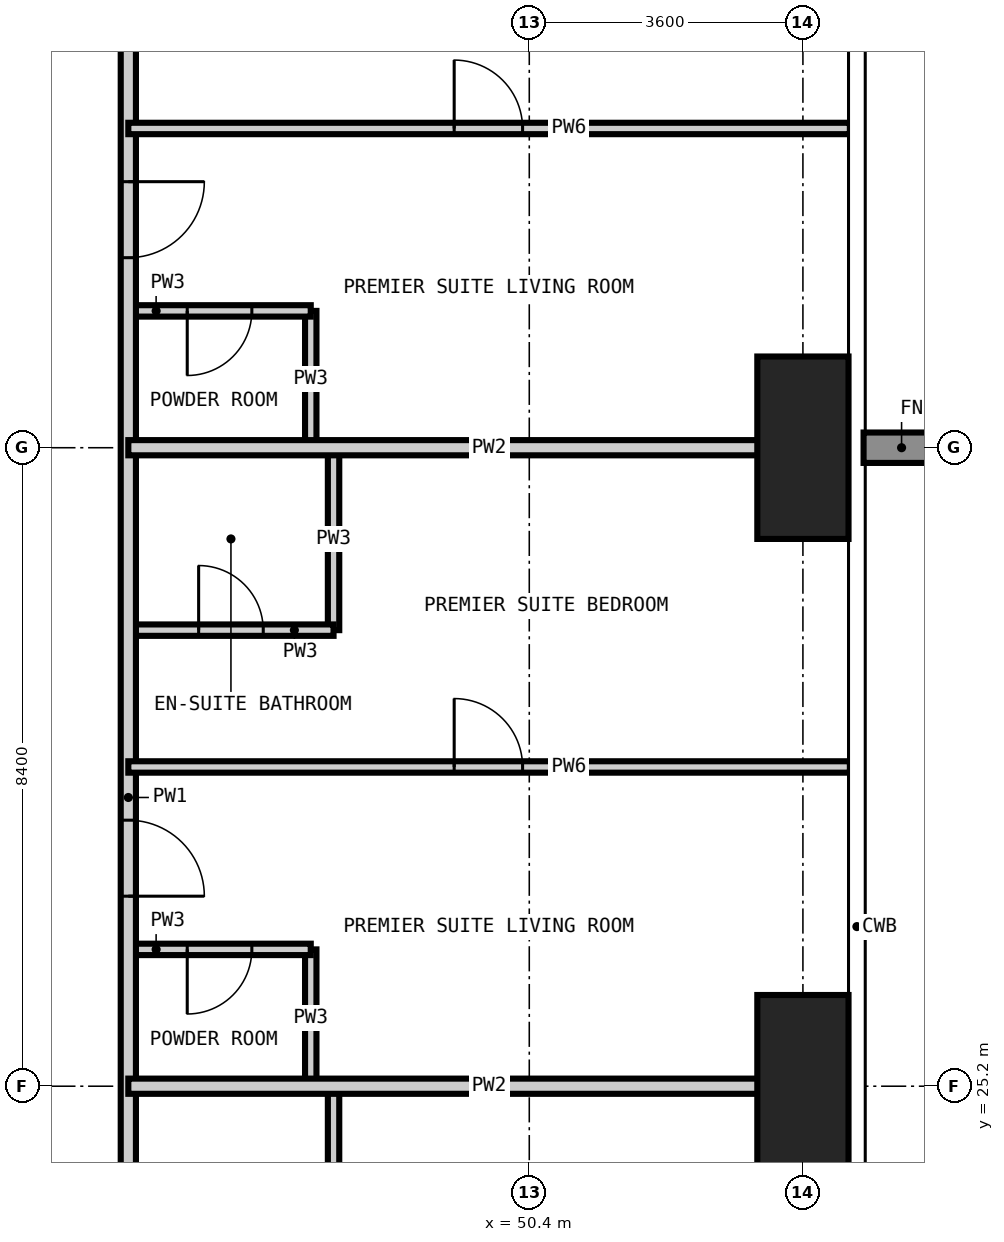
"""IFC4 building model, lengths in metres.
Left out: names, types, materials, properties, quantities, classifications, styles, units other than length and angle.
Written with IfcOpenShell. Run it as: python <this file> out.ifc"""

import sys

from ifc_helpers import new_model, si_unit, direction, frame, frame_2d, origin, origin_2d, place, context, subcontext, project, spatial, rectangle, extrude, element, fill, save


model = new_model("IFC4")
c1 = context("Model", 3, precision=1e-05, world=origin(), true_north=direction((0.0, 1.0)))
c2 = subcontext(c1, "Body", "Model", "MODEL_VIEW")
j1 = project(units=[si_unit("LENGTHUNIT", "METRE"), si_unit("PLANEANGLEUNIT", "RADIAN")], contexts=[c1])
p1 = place(None, origin())
s1 = spatial("IfcSite", under=j1, at=p1, CompositionType="ELEMENT")
p2 = place(p1, origin())
s2 = spatial("IfcBuilding", under=s1, at=p2, CompositionType="ELEMENT")
p3 = place(p2, frame((0.0, 0.0, 118.8)))
s3 = spatial("IfcBuildingStorey", under=s2, at=p3, CompositionType="ELEMENT", Elevation=118.8)
for number, where, z_axis, x_axis in (
    (1, (54.0, 25.2, -0.35), (0.0, 0.0, 1.0), (1.0, 0.0, 0.0)),
    (2, (54.0, 33.6, -0.35), (0.0, 0.0, 1.0), (1.0, 0.0, 0.0)),
):
    element("IfcColumn", number, at=place(p3, frame(where, z_axis=z_axis, x_axis=x_axis)), inside=s3, PredefinedType="COLUMN", context=c2, shape_type="SweptSolid", body=[
        extrude(rectangle(XDim=1.2, YDim=2.4, at=origin_2d()), origin(), (0.0, 0.0, 1.0), 3.6),
    ])
p4 = place(p3, frame((47.525, 25.2, 0.0), z_axis=(0.0, 0.0, 1.0), x_axis=(0.0, 1.0, 0.0)))
e3 = element("IfcWall", 3, at=p4, inside=s3, PredefinedType="PARTITIONING", context=c2, shape_type="SweptSolid", body=[
    extrude(rectangle(XDim=1.8, YDim=0.15, at=frame_2d((0.9, 0.0))), origin(), (0.0, 0.0, 1.0), 3.25),
])
p5 = place(p3, frame((47.525, 33.6, 0.0), z_axis=(0.0, 0.0, 1.0), x_axis=(0.0, 1.0, 0.0)))
e4 = element("IfcWall", 4, at=p5, inside=s3, PredefinedType="PARTITIONING", context=c2, shape_type="SweptSolid", body=[
    extrude(rectangle(XDim=1.8, YDim=0.15, at=frame_2d((0.9, 0.0))), origin(), (0.0, 0.0, 1.0), 3.25),
])
p6 = place(p3, frame((47.825, 22.8, 0.0), z_axis=(0.0, 0.0, 1.0), x_axis=(0.0, 1.0, 0.0)))
e5 = element("IfcWall", 5, at=p6, inside=s3, PredefinedType="PARTITIONING", context=c2, shape_type="SweptSolid", body=[
    extrude(rectangle(XDim=2.4, YDim=0.15, at=frame_2d((1.2, 0.0))), origin(), (0.0, 0.0, 1.0), 3.25),
])
p7 = place(p3, frame((47.825, 31.2, 0.0), z_axis=(0.0, 0.0, 1.0), x_axis=(0.0, 1.0, 0.0)))
e6 = element("IfcWall", 6, at=p7, inside=s3, PredefinedType="PARTITIONING", context=c2, shape_type="SweptSolid", body=[
    extrude(rectangle(XDim=2.4, YDim=0.15, at=frame_2d((1.2, 0.0))), origin(), (0.0, 0.0, 1.0), 3.25),
])
p8 = place(p3, frame((45.125, 27.0, 0.0), z_axis=(0.0, 0.0, 1.0), x_axis=(1.0, 0.0, 0.0)))
e7 = element("IfcWall", 7, at=p8, inside=s3, PredefinedType="PARTITIONING", context=c2, shape_type="SweptSolid", body=[
    extrude(rectangle(XDim=2.4, YDim=0.15, at=frame_2d((1.2, 0.0))), origin(), (0.0, 0.0, 1.0), 3.25),
])
p9 = place(p8, frame((0.775, 0.0, 0.0)))
e8 = element("IfcOpeningElement", 8, at=p9, cuts=e7, PredefinedType="OPENING", context=c2, shape_type="SweptSolid", body=[
    extrude(rectangle(XDim=0.85, YDim=2.1, at=frame_2d((0.425, 1.05))), frame((0.0, 0.085, 0.0), z_axis=(0.0, -1.0, 0.0), x_axis=(1.0, 0.0, 0.0)), (0.0, 0.0, 1.0), 0.17),
])
p10 = place(p3, frame((45.125, 31.2, 0.0), z_axis=(0.0, 0.0, 1.0), x_axis=(1.0, 0.0, 0.0)))
e9 = element("IfcWall", 9, at=p10, inside=s3, PredefinedType="PARTITIONING", context=c2, shape_type="SweptSolid", body=[
    extrude(rectangle(XDim=2.7, YDim=0.15, at=frame_2d((1.35, 0.0))), origin(), (0.0, 0.0, 1.0), 3.25),
])
p11 = place(p10, frame((0.925, 0.0, 0.0)))
e10 = element("IfcOpeningElement", 10, at=p11, cuts=e9, PredefinedType="OPENING", context=c2, shape_type="SweptSolid", body=[
    extrude(rectangle(XDim=0.85, YDim=2.1, at=frame_2d((0.425, 1.05))), frame((0.0, 0.085, 0.0), z_axis=(0.0, -1.0, 0.0), x_axis=(1.0, 0.0, 0.0)), (0.0, 0.0, 1.0), 0.17),
])
p12 = place(p3, frame((45.125, 35.4, 0.0), z_axis=(0.0, 0.0, 1.0), x_axis=(1.0, 0.0, 0.0)))
e11 = element("IfcWall", 11, at=p12, inside=s3, PredefinedType="PARTITIONING", context=c2, shape_type="SweptSolid", body=[
    extrude(rectangle(XDim=2.4, YDim=0.15, at=frame_2d((1.2, 0.0))), origin(), (0.0, 0.0, 1.0), 3.25),
])
p13 = place(p12, frame((0.775, 0.0, 0.0)))
e12 = element("IfcOpeningElement", 12, at=p13, cuts=e11, PredefinedType="OPENING", context=c2, shape_type="SweptSolid", body=[
    extrude(rectangle(XDim=0.85, YDim=2.1, at=frame_2d((0.425, 1.05))), frame((0.0, 0.085, 0.0), z_axis=(0.0, -1.0, 0.0), x_axis=(1.0, 0.0, 0.0)), (0.0, 0.0, 1.0), 0.17),
])
p14 = place(p3, frame((45.125, 44.525, 0.0), z_axis=(0.0, 0.0, 1.0), x_axis=(0.0, -1.0, 0.0)))
e13 = element("IfcWall", 13, at=p14, inside=s3, PredefinedType="PARTITIONING", context=c2, shape_type="SweptSolid", body=[
    extrude(rectangle(XDim=31.45, YDim=0.2, at=frame_2d((15.725, 0.0))), origin(), (0.0, 0.0, 1.0), 3.25),
])
p15 = place(p14, frame((24.225, 0.0, 0.0)))
e14 = element("IfcOpeningElement", 14, at=p15, cuts=e13, PredefinedType="OPENING", context=c2, shape_type="SweptSolid", body=[
    extrude(rectangle(XDim=1.0, YDim=2.2, at=frame_2d((0.5, 1.1))), frame((0.0, 0.11, 0.0), z_axis=(0.0, -1.0, 0.0), x_axis=(1.0, 0.0, 0.0)), (0.0, 0.0, 1.0), 0.22),
])
p16 = place(p14, frame((15.825, 0.0, 0.0)))
e15 = element("IfcOpeningElement", 15, at=p16, cuts=e13, PredefinedType="OPENING", context=c2, shape_type="SweptSolid", body=[
    extrude(rectangle(XDim=1.0, YDim=2.2, at=frame_2d((0.5, 1.1))), frame((0.0, 0.11, 0.0), z_axis=(0.0, -1.0, 0.0), x_axis=(1.0, 0.0, 0.0)), (0.0, 0.0, 1.0), 0.22),
])
p17 = place(p14, frame((7.425, 0.0, 0.0)))
e16 = element("IfcOpeningElement", 16, at=p17, cuts=e13, PredefinedType="OPENING", context=c2, shape_type="SweptSolid", body=[
    extrude(rectangle(XDim=1.0, YDim=2.2, at=frame_2d((0.5, 1.1))), frame((0.0, 0.11, 0.0), z_axis=(0.0, -1.0, 0.0), x_axis=(1.0, 0.0, 0.0)), (0.0, 0.0, 1.0), 0.22),
])
p18 = place(p14, frame((29.087, 0.0, 0.0)))
e17 = element("IfcOpeningElement", 17, at=p18, cuts=e13, PredefinedType="OPENING", context=c2, shape_type="SweptSolid", body=[
    extrude(rectangle(XDim=1.0, YDim=2.2, at=frame_2d((0.5, 1.1))), frame((0.0, 0.11, 0.0), z_axis=(0.0, -1.0, 0.0), x_axis=(1.0, 0.0, 0.0)), (0.0, 0.0, 1.0), 0.22),
])
p19 = place(p14, frame((0.762, 0.0, 0.0)))
e18 = element("IfcOpeningElement", 18, at=p19, cuts=e13, PredefinedType="OPENING", context=c2, shape_type="SweptSolid", body=[
    extrude(rectangle(XDim=1.0, YDim=2.2, at=frame_2d((0.5, 1.1))), frame((0.0, 0.11, 0.0), z_axis=(0.0, -1.0, 0.0), x_axis=(1.0, 0.0, 0.0)), (0.0, 0.0, 1.0), 0.22),
])
for number, where, z_axis, x_axis in (
    (19, (45.125, 25.2, 0.0), (0.0, 0.0, 1.0), (1.0, 0.0, 0.0)),
    (20, (45.125, 33.6, 0.0), (0.0, 0.0, 1.0), (1.0, 0.0, 0.0)),
):
    element("IfcWall", number, at=place(p3, frame(where, z_axis=z_axis, x_axis=x_axis)), inside=s3, PredefinedType="PARTITIONING", context=c2, shape_type="SweptSolid", body=[
        extrude(rectangle(XDim=9.493, YDim=0.2, at=frame_2d((4.747, 0.0))), origin(), (0.0, 0.0, 1.0), 3.25),
    ])
p20 = place(p3, frame((45.125, 29.4, 0.0), z_axis=(0.0, 0.0, 1.0), x_axis=(1.0, 0.0, 0.0)))
e21 = element("IfcWall", 21, at=p20, inside=s3, PredefinedType="PARTITIONING", context=c2, shape_type="SweptSolid", body=[
    extrude(rectangle(XDim=9.493, YDim=0.15, at=frame_2d((4.747, 0.0))), origin(), (0.0, 0.0, 1.0), 3.25),
])
p21 = place(p20, frame((4.287, 0.0, 0.0)))
e22 = element("IfcOpeningElement", 22, at=p21, cuts=e21, PredefinedType="OPENING", context=c2, shape_type="SweptSolid", body=[
    extrude(rectangle(XDim=0.9, YDim=2.1, at=frame_2d((0.45, 1.05))), frame((0.0, 0.085, 0.0), z_axis=(0.0, -1.0, 0.0), x_axis=(1.0, 0.0, 0.0)), (0.0, 0.0, 1.0), 0.17),
])
p22 = place(p3, frame((45.125, 37.8, 0.0), z_axis=(0.0, 0.0, 1.0), x_axis=(1.0, 0.0, 0.0)))
e23 = element("IfcWall", 23, at=p22, inside=s3, PredefinedType="PARTITIONING", context=c2, shape_type="SweptSolid", body=[
    extrude(rectangle(XDim=9.493, YDim=0.15, at=frame_2d((4.747, 0.0))), origin(), (0.0, 0.0, 1.0), 3.25),
])
p23 = place(p22, frame((4.287, 0.0, 0.0)))
e24 = element("IfcOpeningElement", 24, at=p23, cuts=e23, PredefinedType="OPENING", context=c2, shape_type="SweptSolid", body=[
    extrude(rectangle(XDim=0.9, YDim=2.1, at=frame_2d((0.45, 1.05))), frame((0.0, 0.085, 0.0), z_axis=(0.0, -1.0, 0.0), x_axis=(1.0, 0.0, 0.0)), (0.0, 0.0, 1.0), 0.17),
])
p24 = place(p16, origin())
e25 = element("IfcDoor", 25, at=p24, inside=s3, OperationType="SINGLE_SWING_RIGHT", PredefinedType="DOOR", context=c2, shape_type="SweptSolid", body=[
    extrude(rectangle(XDim=1.0, YDim=2.2, at=frame_2d((0.5, 1.1))), frame((0.0, 0.025, 0.0), z_axis=(0.0, -1.0, 0.0), x_axis=(1.0, 0.0, 0.0)), (0.0, 0.0, 1.0), 0.05),
])
fill(e15, e25)
p25 = place(p9, frame((0.85, 0.0, 0.0), z_axis=(0.0, 0.0, 1.0), x_axis=(-1.0, 0.0, 0.0)))
e26 = element("IfcDoor", 26, at=p25, inside=s3, OperationType="SINGLE_SWING_RIGHT", PredefinedType="DOOR", context=c2, shape_type="SweptSolid", body=[
    extrude(rectangle(XDim=0.85, YDim=2.1, at=frame_2d((0.425, 1.05))), frame((0.0, 0.025, 0.0), z_axis=(0.0, -1.0, 0.0), x_axis=(1.0, 0.0, 0.0)), (0.0, 0.0, 1.0), 0.05),
])
fill(e8, e26)
p26 = place(p21, origin())
e27 = element("IfcDoor", 27, at=p26, inside=s3, OperationType="SINGLE_SWING_LEFT", PredefinedType="DOOR", context=c2, shape_type="SweptSolid", body=[
    extrude(rectangle(XDim=0.9, YDim=2.1, at=frame_2d((0.45, 1.05))), frame((0.0, 0.025, 0.0), z_axis=(0.0, -1.0, 0.0), x_axis=(1.0, 0.0, 0.0)), (0.0, 0.0, 1.0), 0.05),
])
fill(e22, e27)
p27 = place(p11, origin())
e28 = element("IfcDoor", 28, at=p27, inside=s3, OperationType="SINGLE_SWING_LEFT", PredefinedType="DOOR", context=c2, shape_type="SweptSolid", body=[
    extrude(rectangle(XDim=0.85, YDim=2.1, at=frame_2d((0.425, 1.05))), frame((0.0, 0.025, 0.0), z_axis=(0.0, -1.0, 0.0), x_axis=(1.0, 0.0, 0.0)), (0.0, 0.0, 1.0), 0.05),
])
fill(e10, e28)
p28 = place(p17, origin())
e29 = element("IfcDoor", 29, at=p28, inside=s3, OperationType="SINGLE_SWING_LEFT", PredefinedType="DOOR", context=c2, shape_type="SweptSolid", body=[
    extrude(rectangle(XDim=1.0, YDim=2.2, at=frame_2d((0.5, 1.1))), frame((0.0, 0.025, 0.0), z_axis=(0.0, -1.0, 0.0), x_axis=(1.0, 0.0, 0.0)), (0.0, 0.0, 1.0), 0.05),
])
fill(e16, e29)
p29 = place(p13, frame((0.85, 0.0, 0.0), z_axis=(0.0, 0.0, 1.0), x_axis=(-1.0, 0.0, 0.0)))
e30 = element("IfcDoor", 30, at=p29, inside=s3, OperationType="SINGLE_SWING_RIGHT", PredefinedType="DOOR", context=c2, shape_type="SweptSolid", body=[
    extrude(rectangle(XDim=0.85, YDim=2.1, at=frame_2d((0.425, 1.05))), frame((0.0, 0.025, 0.0), z_axis=(0.0, -1.0, 0.0), x_axis=(1.0, 0.0, 0.0)), (0.0, 0.0, 1.0), 0.05),
])
fill(e12, e30)
p30 = place(p23, origin())
e31 = element("IfcDoor", 31, at=p30, inside=s3, OperationType="SINGLE_SWING_LEFT", PredefinedType="DOOR", context=c2, shape_type="SweptSolid", body=[
    extrude(rectangle(XDim=0.9, YDim=2.1, at=frame_2d((0.45, 1.05))), frame((0.0, 0.025, 0.0), z_axis=(0.0, -1.0, 0.0), x_axis=(1.0, 0.0, 0.0)), (0.0, 0.0, 1.0), 0.05),
])
fill(e24, e31)
save(model, sys.argv[1])
